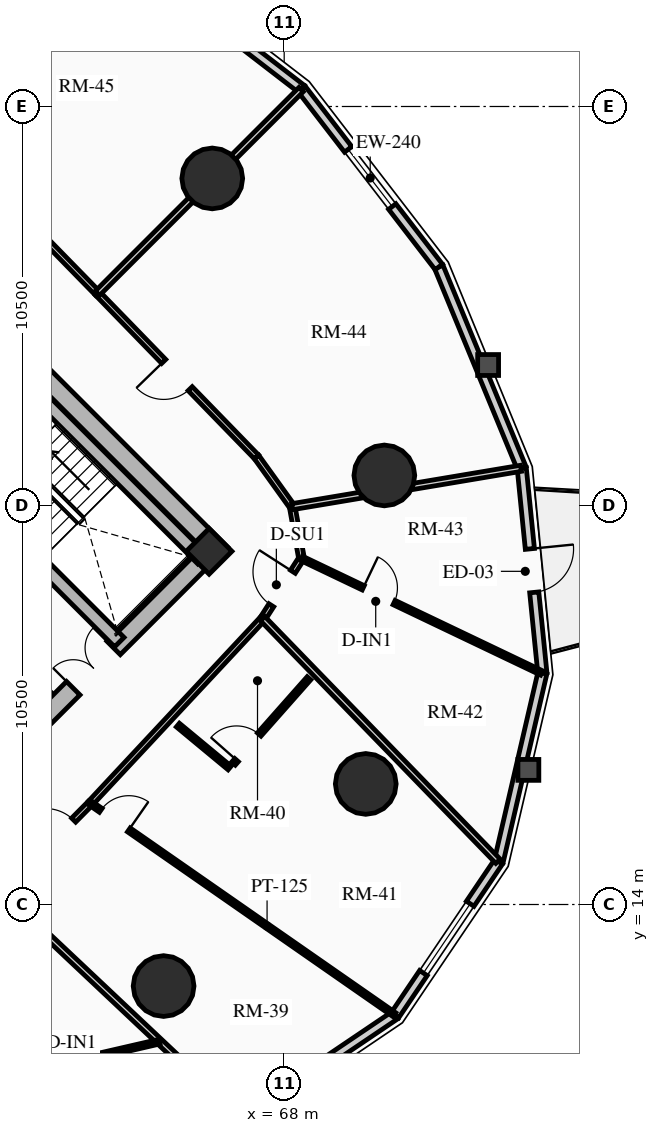
"""IFC4 building model, lengths in metres.
Left out: names, types, materials, properties, quantities, classifications, styles, units other than length and angle.
Written with IfcOpenShell. Run it as: python <this file> out.ifc"""

import sys

from ifc_helpers import new_model, si_unit, direction, frame, frame_2d, origin, origin_2d, place, context, subcontext, project, spatial, rectangle, circle, extrude, source, transform, mapped, element, fill, save


model = new_model("IFC4")
c1 = context("Model", 3, precision=1e-05, world=origin(), true_north=direction((0.0, 1.0)))
c2 = subcontext(c1, "Body", "Model", "MODEL_VIEW")
j1 = project(units=[si_unit("LENGTHUNIT", "METRE"), si_unit("PLANEANGLEUNIT", "RADIAN")], contexts=[c1])
p1 = place(None, origin())
s1 = spatial("IfcSite", under=j1, at=p1, CompositionType="ELEMENT")
p2 = place(p1, origin())
s2 = spatial("IfcBuilding", under=s1, at=p2, CompositionType="ELEMENT")
p3 = place(p2, frame((0.0, 0.0, 42.37)))
s3 = spatial("IfcBuildingStorey", under=s2, at=p3, CompositionType="ELEMENT", Elevation=42.37)
p4 = place(p3, frame((66.339, 23.227, 0.0), z_axis=(0.0, 0.0, 1.0), x_axis=(-0.707106781187, 0.707106781187, 0.0)))
e1 = element("IfcWall", 1, at=p4, inside=s3, PredefinedType="SHEAR", context=c2, shape_type="SweptSolid", body=[
    extrude(rectangle(XDim=14.3, YDim=0.5, at=frame_2d((7.15, 0.0))), origin(), (0.0, 0.0, 1.0), 2.91),
])
p5 = place(p3, frame((58.596, 15.838, 0.0), z_axis=(0.0, 0.0, 1.0), x_axis=(0.707106781187, 0.707106781187, 0.0)))
e2 = element("IfcWall", 2, at=p5, inside=s3, PredefinedType="SHEAR", context=c2, shape_type="SweptSolid", body=[
    extrude(rectangle(XDim=10.7, YDim=0.5, at=frame_2d((5.35, 0.0))), origin(), (0.0, 0.0, 1.0), 2.91),
])
m1 = source(origin(), c2, "Body", "SweptSolid", [
    extrude(rectangle(XDim=1.5, YDim=2.02, at=frame_2d((0.75, 1.01))), frame((0.0, 0.26, 0.0), z_axis=(0.0, -1.0, 0.0), x_axis=(1.0, 0.0, 0.0)), (0.0, 0.0, 1.0), 0.52),
])
p6 = place(p5, frame((5.45, 0.0, 0.0)))
e3 = element("IfcOpeningElement", 3, at=p6, cuts=e2, PredefinedType="OPENING", context=c2, shape_type="MappedRepresentation", body=[
    mapped(m1, transform((0.0, 0.0, 0.0), x_axis=(1.0, 0.0, 0.0), y_axis=(0.0, 1.0, 0.0), z_axis=(0.0, 0.0, 1.0), scale=1.0)),
])
p7 = place(p3, frame((63.662, 20.904, 0.0), z_axis=(0.0, 0.0, 1.0), x_axis=(-0.707106781187, 0.707106781187, 0.0)))
e4 = element("IfcWall", 4, at=p7, inside=s3, PredefinedType="SHEAR", context=c2, shape_type="SweptSolid", body=[
    extrude(rectangle(XDim=13.8, YDim=0.35, at=frame_2d((6.9, 0.0))), origin(), (0.0, 0.0, 1.0), 2.91),
])
m2 = source(origin(), c2, "Body", "SweptSolid", [
    extrude(rectangle(XDim=1.1, YDim=2.015, at=frame_2d((0.55, 1.007))), frame((0.0, 0.185, 0.0), z_axis=(0.0, -1.0, 0.0), x_axis=(1.0, 0.0, 0.0)), (0.0, 0.0, 1.0), 0.37),
])
p8 = place(p7, frame((10.025, 0.0, 0.0)))
e5 = element("IfcOpeningElement", 5, at=p8, cuts=e4, PredefinedType="OPENING", context=c2, shape_type="MappedRepresentation", body=[
    mapped(m2, transform((0.0, 0.0, 0.0), x_axis=(1.0, 0.0, 0.0), y_axis=(0.0, 1.0, 0.0), z_axis=(0.0, 0.0, 1.0), scale=1.0)),
])
p9 = place(p7, frame((12.025, 0.0, 0.0)))
e6 = element("IfcOpeningElement", 6, at=p9, cuts=e4, PredefinedType="OPENING", context=c2, shape_type="MappedRepresentation", body=[
    mapped(m2, transform((0.0, 0.0, 0.0), x_axis=(1.0, 0.0, 0.0), y_axis=(0.0, 1.0, 0.0), z_axis=(0.0, 0.0, 1.0), scale=1.0)),
])
m3 = source(origin(), c2, "Body", "SweptSolid", [
    extrude(rectangle(XDim=1.15, YDim=2.02, at=frame_2d((0.575, 1.01))), frame((0.0, 0.185, 0.0), z_axis=(0.0, -1.0, 0.0), x_axis=(1.0, 0.0, 0.0)), (0.0, 0.0, 1.0), 0.37),
])
p10 = place(p7, frame((5.33, 0.0, 0.0)))
e7 = element("IfcOpeningElement", 7, at=p10, cuts=e4, PredefinedType="OPENING", context=c2, shape_type="MappedRepresentation", body=[
    mapped(m3, transform((0.0, 0.0, 0.0), x_axis=(1.0, 0.0, 0.0), y_axis=(0.0, 1.0, 0.0), z_axis=(0.0, 0.0, 1.0), scale=1.0)),
])
p11 = place(p3, frame((65.847, 23.089, 0.0), z_axis=(0.0, 0.0, 1.0), x_axis=(-0.707106781187, 0.707106781187, 0.0)))
e8 = element("IfcWall", 8, at=p11, inside=s3, PredefinedType="SHEAR", context=c2, shape_type="SweptSolid", body=[
    extrude(rectangle(XDim=6.745, YDim=0.35, at=frame_2d((3.373, 0.0))), origin(), (0.0, 0.0, 1.0), 2.91),
])
p12 = place(p3, frame((66.024, 23.294, 0.0), z_axis=(0.0, 0.0, 1.0), x_axis=(0.707106781187, 0.707106781187, 0.0)))
e9 = element("IfcColumn", 9, at=p12, inside=s3, PredefinedType="COLUMN", context=c2, shape_type="SweptSolid", body=[
    extrude(rectangle(XDim=0.85, YDim=0.85, at=origin_2d()), origin(), (0.0, 0.0, 1.0), 2.91),
])
for number, where, z_axis, x_axis in (
    (10, (66.107, 33.107, 0.0), (0.0, 0.0, 1.0), (1.0, 0.0, 0.0)),
    (11, (64.827, 11.854, 0.0), (0.0, 0.0, 1.0), (1.0, 0.0, 0.0)),
    (12, (70.146, 17.173, 0.0), (0.0, 0.0, 1.0), (1.0, 0.0, 0.0)),
    (13, (70.635, 25.291, 0.0), (0.0, 0.0, 1.0), (1.0, 0.0, 0.0)),
):
    element("IfcColumn", number, at=place(p3, frame(where, z_axis=z_axis, x_axis=x_axis)), inside=s3, PredefinedType="USERDEFINED", context=c2, shape_type="SweptSolid", body=[
        extrude(circle(Radius=0.8, at=origin_2d()), origin(), (0.0, 0.0, 1.0), 2.91),
    ])
p13 = place(p3, frame((63.778, 39.068, 0.0), z_axis=(0.0, 0.0, 1.0), x_axis=(0.792020182601, -0.610494906082, 0.0)))
e14 = element("IfcWall", 14, at=p13, inside=s3, PredefinedType="SOLIDWALL", context=c2, shape_type="SweptSolid", body=[
    extrude(rectangle(XDim=5.911, YDim=0.24, at=frame_2d((2.956, 0.0))), origin(), (0.0, 0.0, 1.0), 2.073),
])
p14 = place(p3, frame((70.914, 11.086, 0.0), z_axis=(0.0, 0.0, 1.0), x_axis=(-0.828748297084, -0.559621532896, 0.0)))
e15 = element("IfcWall", 15, at=p14, inside=s3, PredefinedType="SOLIDWALL", context=c2, shape_type="SweptSolid", body=[
    extrude(rectangle(XDim=4.879, YDim=0.24, at=frame_2d((2.439, 0.0))), origin(), (0.0, 0.0, 1.0), 2.073),
])
p15 = place(p3, frame((73.644, 15.129, 0.0), z_axis=(0.0, 0.0, 1.0), x_axis=(-0.559621532896, -0.828748297084, 0.0)))
e16 = element("IfcWall", 16, at=p15, inside=s3, PredefinedType="SOLIDWALL", context=c2, shape_type="SweptSolid", body=[
    extrude(rectangle(XDim=4.879, YDim=0.24, at=frame_2d((2.439, 0.0))), origin(), (0.0, 0.0, 1.0), 2.073),
])
m4 = source(origin(), c2, "Body", "SweptSolid", [
    extrude(rectangle(XDim=2.2, YDim=1.35, at=frame_2d((1.1, 0.675))), frame((0.0, 0.13, 0.0), z_axis=(0.0, -1.0, 0.0), x_axis=(1.0, 0.0, 0.0)), (0.0, 0.0, 1.0), 0.26),
])
p16 = place(p15, frame((1.339, 0.0, 0.65)))
e17 = element("IfcOpeningElement", 17, at=p16, cuts=e16, PredefinedType="OPENING", context=c2, shape_type="MappedRepresentation", body=[
    mapped(m4, transform((0.0, 0.0, 0.0), x_axis=(1.0, 0.0, 0.0), y_axis=(0.0, 1.0, 0.0), z_axis=(0.0, 0.0, 1.0), scale=1.0)),
])
p17 = place(p3, frame((74.794, 20.09, 0.0), z_axis=(0.0, 0.0, 1.0), x_axis=(-0.22582585901, -0.974167686491, 0.0)))
e18 = element("IfcWall", 18, at=p17, inside=s3, PredefinedType="SOLIDWALL", context=c2, shape_type="SweptSolid", body=[
    extrude(rectangle(XDim=5.092, YDim=0.24, at=frame_2d((2.546, 0.0))), origin(), (0.0, 0.0, 1.0), 2.073),
])
p18 = place(p3, frame((74.251, 25.482, 0.0), z_axis=(0.0, 0.0, 1.0), x_axis=(0.100190592135, -0.994968263437, 0.0)))
e19 = element("IfcWall", 19, at=p18, inside=s3, PredefinedType="SOLIDWALL", context=c2, shape_type="SweptSolid", body=[
    extrude(rectangle(XDim=5.419, YDim=0.24, at=frame_2d((2.71, 0.0))), origin(), (0.0, 0.0, 1.0), 2.073),
])
m5 = source(origin(), c2, "Body", "SweptSolid", [
    extrude(rectangle(XDim=1.15, YDim=2.005, at=frame_2d((0.575, 1.002))), frame((0.0, 0.13, 0.0), z_axis=(0.0, -1.0, 0.0), x_axis=(1.0, 0.0, 0.0)), (0.0, 0.0, 1.0), 0.26),
])
p19 = place(p18, frame((2.135, 0.0, 0.0)))
e20 = element("IfcOpeningElement", 20, at=p19, cuts=e19, PredefinedType="OPENING", context=c2, shape_type="MappedRepresentation", body=[
    mapped(m5, transform((0.0, 0.0, 0.0), x_axis=(1.0, 0.0, 0.0), y_axis=(0.0, 1.0, 0.0), z_axis=(0.0, 0.0, 1.0), scale=1.0)),
])
p20 = place(p3, frame((72.068, 30.778, 0.0), z_axis=(0.0, 0.0, 1.0), x_axis=(0.381077764176, -0.924542988536, 0.0)))
e21 = element("IfcWall", 21, at=p20, inside=s3, PredefinedType="SOLIDWALL", context=c2, shape_type="SweptSolid", body=[
    extrude(rectangle(XDim=5.728, YDim=0.24, at=frame_2d((2.864, 0.0))), origin(), (0.0, 0.0, 1.0), 2.073),
])
p21 = place(p3, frame((68.459, 35.459, 0.0), z_axis=(0.0, 0.0, 1.0), x_axis=(0.610494906082, -0.792020182601, 0.0)))
e22 = element("IfcWall", 22, at=p21, inside=s3, PredefinedType="SOLIDWALL", context=c2, shape_type="SweptSolid", body=[
    extrude(rectangle(XDim=5.911, YDim=0.24, at=frame_2d((2.956, 0.0))), origin(), (0.0, 0.0, 1.0), 2.073),
])
m6 = source(origin(), c2, "Body", "SweptSolid", [
    extrude(rectangle(XDim=1.9, YDim=1.35, at=frame_2d((0.95, 0.675))), frame((0.0, 0.13, 0.0), z_axis=(0.0, -1.0, 0.0), x_axis=(1.0, 0.0, 0.0)), (0.0, 0.0, 1.0), 0.26),
])
p22 = place(p21, frame((2.005, 0.0, 0.65)))
e23 = element("IfcOpeningElement", 23, at=p22, cuts=e22, PredefinedType="OPENING", context=c2, shape_type="MappedRepresentation", body=[
    mapped(m6, transform((0.0, 0.0, 0.0), x_axis=(1.0, 0.0, 0.0), y_axis=(0.0, 1.0, 0.0), z_axis=(0.0, 0.0, 1.0), scale=1.0)),
])
p23 = place(p3, frame((63.086, 30.086, 0.0), z_axis=(0.0, 0.0, 1.0), x_axis=(-0.699075897379, 0.715047473741, 0.0)))
e24 = element("IfcWall", 24, at=p23, inside=s3, PredefinedType="PARTITIONING", context=c2, shape_type="SweptSolid", body=[
    extrude(rectangle(XDim=6.114, YDim=0.15, at=frame_2d((3.057, 0.0))), origin(), (0.0, 0.0, 1.0), 2.159),
])
p24 = place(p3, frame((60.562, 14.31, 0.0), z_axis=(0.0, 0.0, 1.0), x_axis=(0.704566236161, 0.709638230975, 0.0)))
e25 = element("IfcWall", 25, at=p24, inside=s3, PredefinedType="PARTITIONING", context=c2, shape_type="SweptSolid", body=[
    extrude(rectangle(XDim=3.321, YDim=0.15, at=frame_2d((1.661, 0.0))), origin(), (0.0, 0.0, 1.0), 2.159),
])
m7 = source(origin(), c2, "Body", "SweptSolid", [
    extrude(rectangle(XDim=1.05, YDim=2.015, at=frame_2d((0.525, 1.007))), frame((0.0, 0.085, 0.0), z_axis=(0.0, -1.0, 0.0), x_axis=(1.0, 0.0, 0.0)), (0.0, 0.0, 1.0), 0.17),
])
p25 = place(p24, frame((1.643, 0.0, 0.0)))
e26 = element("IfcOpeningElement", 26, at=p25, cuts=e25, PredefinedType="OPENING", context=c2, shape_type="MappedRepresentation", body=[
    mapped(m7, transform((0.0, 0.0, 0.0), x_axis=(1.0, 0.0, 0.0), y_axis=(0.0, 1.0, 0.0), z_axis=(0.0, 0.0, 1.0), scale=1.0)),
])
p26 = place(p3, frame((62.903, 16.667, 0.0), z_axis=(0.0, 0.0, 1.0), x_axis=(0.682371947497, 0.731005147225, 0.0)))
e27 = element("IfcWall", 27, at=p26, inside=s3, PredefinedType="PARTITIONING", context=c2, shape_type="SweptSolid", body=[
    extrude(rectangle(XDim=6.642, YDim=0.15, at=frame_2d((3.321, 0.0))), origin(), (0.0, 0.0, 1.0), 2.159),
])
p27 = place(p3, frame((67.435, 21.521, 0.0), z_axis=(0.0, 0.0, 1.0), x_axis=(0.540777197838, 0.841165870859, 0.0)))
e28 = element("IfcWall", 28, at=p27, inside=s3, PredefinedType="PARTITIONING", context=c2, shape_type="SweptSolid", body=[
    extrude(rectangle(XDim=1.888, YDim=0.15, at=frame_2d((0.944, 0.0))), origin(), (0.0, 0.0, 1.0), 2.205),
])
p28 = place(p27, frame((0.419, 0.0, 0.0)))
e29 = element("IfcOpeningElement", 29, at=p28, cuts=e28, PredefinedType="OPENING", context=c2, shape_type="MappedRepresentation", body=[
    mapped(m7, transform((0.0, 0.0, 0.0), x_axis=(1.0, 0.0, 0.0), y_axis=(0.0, 1.0, 0.0), z_axis=(0.0, 0.0, 1.0), scale=1.0)),
])
p29 = place(p3, frame((68.456, 23.11, 0.0), z_axis=(0.0, 0.0, 1.0), x_axis=(-0.1772522795, 0.984165448191, 0.0)))
e30 = element("IfcWall", 30, at=p29, inside=s3, PredefinedType="PARTITIONING", context=c2, shape_type="SweptSolid", body=[
    extrude(rectangle(XDim=1.382, YDim=0.15, at=frame_2d((0.691, 0.0))), origin(), (0.0, 0.0, 1.0), 2.159),
])
p30 = place(p3, frame((68.211, 24.469, 0.0), z_axis=(0.0, 0.0, 1.0), x_axis=(-0.583012141368, 0.812463441034, 0.0)))
e31 = element("IfcWall", 31, at=p30, inside=s3, PredefinedType="PARTITIONING", context=c2, shape_type="SweptSolid", body=[
    extrude(rectangle(XDim=1.613, YDim=0.15, at=frame_2d((0.807, 0.0))), origin(), (0.0, 0.0, 1.0), 2.205),
])
p31 = place(p3, frame((67.27, 25.78, 0.0), z_axis=(0.0, 0.0, 1.0), x_axis=(-0.696847842907, 0.717218992942, 0.0)))
e32 = element("IfcWall", 32, at=p31, inside=s3, PredefinedType="PARTITIONING", context=c2, shape_type="SweptSolid", body=[
    extrude(rectangle(XDim=6.004, YDim=0.15, at=frame_2d((3.002, 0.0))), origin(), (0.0, 0.0, 1.0), 2.635),
])
m8 = source(origin(), c2, "Body", "SweptSolid", [
    extrude(rectangle(XDim=1.0, YDim=2.015, at=frame_2d((0.5, 1.007))), frame((0.0, 0.085, 0.0), z_axis=(0.0, -1.0, 0.0), x_axis=(1.0, 0.0, 0.0)), (0.0, 0.0, 1.0), 0.17),
])
p32 = place(p31, frame((2.502, 0.0, 0.0)))
e33 = element("IfcOpeningElement", 33, at=p32, cuts=e32, PredefinedType="OPENING", context=c2, shape_type="MappedRepresentation", body=[
    mapped(m8, transform((0.0, 0.0, 0.0), x_axis=(1.0, 0.0, 0.0), y_axis=(0.0, 1.0, 0.0), z_axis=(0.0, 0.0, 1.0), scale=1.0)),
])
p33 = place(p3, frame((63.086, 30.086, 0.0), z_axis=(0.0, 0.0, 1.0), x_axis=(0.707106781187, 0.707106781187, 0.0)))
e34 = element("IfcWall", 34, at=p33, inside=s3, PredefinedType="PARTITIONING", context=c2, shape_type="SweptSolid", body=[
    extrude(rectangle(XDim=7.579, YDim=0.16, at=frame_2d((3.79, 0.0))), origin(), (0.0, 0.0, 1.0), 2.073),
])
p34 = place(p3, frame((60.562, 14.31, 0.0), z_axis=(0.0, 0.0, 1.0), x_axis=(0.727781661561, -0.685808904211, 0.0)))
e35 = element("IfcWall", 35, at=p34, inside=s3, PredefinedType="PARTITIONING", context=c2, shape_type="SweptSolid", body=[
    extrude(rectangle(XDim=8.655, YDim=0.16, at=frame_2d((4.328, 0.0))), origin(), (0.0, 0.0, 1.0), 2.073),
])
p35 = place(p3, frame((67.435, 21.521, 0.0), z_axis=(0.0, 0.0, 1.0), x_axis=(0.6962628802, -0.717786877601, 0.0)))
e36 = element("IfcWall", 36, at=p35, inside=s3, PredefinedType="PARTITIONING", context=c2, shape_type="SweptSolid", body=[
    extrude(rectangle(XDim=8.893, YDim=0.16, at=frame_2d((4.446, 0.0))), origin(), (0.0, 0.0, 1.0), 2.073),
])
p36 = place(p3, frame((68.211, 24.469, 0.0), z_axis=(0.0, 0.0, 1.0), x_axis=(0.986231309699, 0.165371713934, 0.0)))
e37 = element("IfcWall", 37, at=p36, inside=s3, PredefinedType="PARTITIONING", context=c2, shape_type="SweptSolid", body=[
    extrude(rectangle(XDim=6.104, YDim=0.16, at=frame_2d((3.052, 0.0))), origin(), (0.0, 0.0, 1.0), 2.073),
])
p37 = place(p3, frame((60.921, 9.517, 0.0), z_axis=(0.0, 0.0, 1.0), x_axis=(0.974453436038, 0.224589627973, 0.0)))
e38 = element("IfcWall", 38, at=p37, inside=s3, PredefinedType="PARTITIONING", context=c2, shape_type="SweptSolid", body=[
    extrude(rectangle(XDim=3.898, YDim=0.125, at=frame_2d((1.949, 0.0))), origin(), (0.0, 0.0, 1.0), 2.205),
])
p38 = place(p3, frame((62.903, 16.667, 0.0), z_axis=(0.0, 0.0, 1.0), x_axis=(0.820761665638, -0.571270766116, 0.0)))
e39 = element("IfcWall", 39, at=p38, inside=s3, PredefinedType="PARTITIONING", context=c2, shape_type="SweptSolid", body=[
    extrude(rectangle(XDim=9.743, YDim=0.125, at=frame_2d((4.872, 0.0))), origin(), (0.0, 0.0, 1.0), 2.073),
])
m9 = source(origin(), c2, "Body", "SweptSolid", [
    extrude(rectangle(XDim=0.9, YDim=2.005, at=frame_2d((0.45, 1.002))), frame((0.0, 0.073, 0.0), z_axis=(0.0, -1.0, 0.0), x_axis=(1.0, 0.0, 0.0)), (0.0, 0.0, 1.0), 0.145),
])
p39 = place(p38, frame((0.33, 0.0, 0.0)))
e40 = element("IfcOpeningElement", 40, at=p39, cuts=e39, PredefinedType="OPENING", context=c2, shape_type="MappedRepresentation", body=[
    mapped(m9, transform((0.0, 0.0, 0.0), x_axis=(1.0, 0.0, 0.0), y_axis=(0.0, 1.0, 0.0), z_axis=(0.0, 0.0, 1.0), scale=1.0)),
])
p40 = place(p3, frame((65.202, 18.721, 0.0), z_axis=(0.0, 0.0, 1.0), x_axis=(0.769814202386, -0.638268042287, 0.0)))
e41 = element("IfcWall", 41, at=p40, inside=s3, PredefinedType="PARTITIONING", context=c2, shape_type="SweptSolid", body=[
    extrude(rectangle(XDim=1.769, YDim=0.125, at=frame_2d((0.884, 0.0))), origin(), (0.0, 0.0, 1.0), 2.635),
])
p41 = place(p3, frame((66.667, 17.709, 0.0), z_axis=(0.0, 0.0, 1.0), x_axis=(0.662510581678, 0.749052554341, 0.0)))
e42 = element("IfcWall", 42, at=p41, inside=s3, PredefinedType="PARTITIONING", context=c2, shape_type="SweptSolid", body=[
    extrude(rectangle(XDim=2.996, YDim=0.125, at=frame_2d((1.498, 0.0))), origin(), (0.0, 0.0, 1.0), 2.159),
])
p42 = place(p41, frame((0.12, 0.0, 0.0)))
e43 = element("IfcOpeningElement", 43, at=p42, cuts=e42, PredefinedType="OPENING", context=c2, shape_type="MappedRepresentation", body=[
    mapped(m9, transform((0.0, 0.0, 0.0), x_axis=(1.0, 0.0, 0.0), y_axis=(0.0, 1.0, 0.0), z_axis=(0.0, 0.0, 1.0), scale=1.0)),
])
p43 = place(p3, frame((68.456, 23.11, 0.0), z_axis=(0.0, 0.0, 1.0), x_axis=(0.902430819297, -0.430834790125, 0.0)))
e44 = element("IfcWall", 44, at=p43, inside=s3, PredefinedType="PARTITIONING", context=c2, shape_type="SweptSolid", body=[
    extrude(rectangle(XDim=7.002, YDim=0.125, at=frame_2d((3.501, 0.0))), origin(), (0.0, 0.0, 1.0), 2.073),
])
p44 = place(p43, frame((1.8, 0.0, 0.0)))
e45 = element("IfcOpeningElement", 45, at=p44, cuts=e44, PredefinedType="OPENING", context=c2, shape_type="MappedRepresentation", body=[
    mapped(m9, transform((0.0, 0.0, 0.0), x_axis=(1.0, 0.0, 0.0), y_axis=(0.0, 1.0, 0.0), z_axis=(0.0, 0.0, 1.0), scale=1.0)),
])
m10 = source(origin(), c2, "Body", "SweptSolid", [
    extrude(rectangle(XDim=2.2, YDim=1.35, at=frame_2d((1.1, 0.675))), frame((0.0, 0.03, 0.0), z_axis=(0.0, -1.0, 0.0), x_axis=(1.0, 0.0, 0.0)), (0.0, 0.0, 1.0), 0.06),
])
p45 = place(p16, origin())
e46 = element("IfcWindow", 46, at=p45, inside=s3, PartitioningType="DOUBLE_PANEL_VERTICAL", PredefinedType="WINDOW", context=c2, shape_type="MappedRepresentation", body=[
    mapped(m10, transform((0.0, 0.0, 0.0), x_axis=(1.0, 0.0, 0.0), y_axis=(0.0, 1.0, 0.0), z_axis=(0.0, 0.0, 1.0), scale=1.0)),
])
fill(e17, e46)
m11 = source(origin(), c2, "Body", "SweptSolid", [
    extrude(rectangle(XDim=1.15, YDim=2.005, at=frame_2d((0.575, 1.002))), frame((0.0, 0.025, 0.0), z_axis=(0.0, -1.0, 0.0), x_axis=(1.0, 0.0, 0.0)), (0.0, 0.0, 1.0), 0.05),
])
p46 = place(p19, origin())
e47 = element("IfcDoor", 47, at=p46, inside=s3, OperationType="SINGLE_SWING_LEFT", PredefinedType="DOOR", context=c2, shape_type="MappedRepresentation", body=[
    mapped(m11, transform((0.0, 0.0, 0.0), x_axis=(1.0, 0.0, 0.0), y_axis=(0.0, 1.0, 0.0), z_axis=(0.0, 0.0, 1.0), scale=1.0)),
])
fill(e20, e47)
m12 = source(origin(), c2, "Body", "SweptSolid", [
    extrude(rectangle(XDim=1.9, YDim=1.35, at=frame_2d((0.95, 0.675))), frame((0.0, 0.03, 0.0), z_axis=(0.0, -1.0, 0.0), x_axis=(1.0, 0.0, 0.0)), (0.0, 0.0, 1.0), 0.06),
])
p47 = place(p22, origin())
e48 = element("IfcWindow", 48, at=p47, inside=s3, PartitioningType="DOUBLE_PANEL_VERTICAL", PredefinedType="WINDOW", context=c2, shape_type="MappedRepresentation", body=[
    mapped(m12, transform((0.0, 0.0, 0.0), x_axis=(1.0, 0.0, 0.0), y_axis=(0.0, 1.0, 0.0), z_axis=(0.0, 0.0, 1.0), scale=1.0)),
])
fill(e23, e48)
m13 = source(origin(), c2, "Body", "SweptSolid", [
    extrude(rectangle(XDim=1.5, YDim=2.02, at=frame_2d((0.75, 1.01))), frame((0.0, 0.025, 0.0), z_axis=(0.0, -1.0, 0.0), x_axis=(1.0, 0.0, 0.0)), (0.0, 0.0, 1.0), 0.05),
])
p48 = place(p6, origin())
e49 = element("IfcDoor", 49, at=p48, inside=s3, OperationType="DOUBLE_DOOR_SINGLE_SWING", PredefinedType="DOOR", context=c2, shape_type="MappedRepresentation", body=[
    mapped(m13, transform((0.0, 0.0, 0.0), x_axis=(1.0, 0.0, 0.0), y_axis=(0.0, 1.0, 0.0), z_axis=(0.0, 0.0, 1.0), scale=1.0)),
])
fill(e3, e49)
m14 = source(origin(), c2, "Body", "SweptSolid", [
    extrude(rectangle(XDim=1.05, YDim=2.015, at=frame_2d((0.525, 1.007))), frame((0.0, 0.025, 0.0), z_axis=(0.0, -1.0, 0.0), x_axis=(1.0, 0.0, 0.0)), (0.0, 0.0, 1.0), 0.05),
])
p49 = place(p25, origin())
e50 = element("IfcDoor", 50, at=p49, inside=s3, OperationType="SINGLE_SWING_LEFT", PredefinedType="DOOR", context=c2, shape_type="MappedRepresentation", body=[
    mapped(m14, transform((0.0, 0.0, 0.0), x_axis=(1.0, 0.0, 0.0), y_axis=(0.0, 1.0, 0.0), z_axis=(0.0, 0.0, 1.0), scale=1.0)),
])
fill(e26, e50)
m15 = source(origin(), c2, "Body", "SweptSolid", [
    extrude(rectangle(XDim=0.9, YDim=2.005, at=frame_2d((0.45, 1.002))), frame((0.0, 0.025, 0.0), z_axis=(0.0, -1.0, 0.0), x_axis=(1.0, 0.0, 0.0)), (0.0, 0.0, 1.0), 0.05),
])
p50 = place(p39, origin())
e51 = element("IfcDoor", 51, at=p50, inside=s3, OperationType="SINGLE_SWING_RIGHT", PredefinedType="DOOR", context=c2, shape_type="MappedRepresentation", body=[
    mapped(m15, transform((0.0, 0.0, 0.0), x_axis=(1.0, 0.0, 0.0), y_axis=(0.0, 1.0, 0.0), z_axis=(0.0, 0.0, 1.0), scale=1.0)),
])
fill(e40, e51)
p51 = place(p42, origin())
e52 = element("IfcDoor", 52, at=p51, inside=s3, OperationType="SINGLE_SWING_LEFT", PredefinedType="DOOR", context=c2, shape_type="MappedRepresentation", body=[
    mapped(m15, transform((0.0, 0.0, 0.0), x_axis=(1.0, 0.0, 0.0), y_axis=(0.0, 1.0, 0.0), z_axis=(0.0, 0.0, 1.0), scale=1.0)),
])
fill(e43, e52)
p52 = place(p28, origin())
e53 = element("IfcDoor", 53, at=p52, inside=s3, OperationType="SINGLE_SWING_RIGHT", PredefinedType="DOOR", context=c2, shape_type="MappedRepresentation", body=[
    mapped(m14, transform((0.0, 0.0, 0.0), x_axis=(1.0, 0.0, 0.0), y_axis=(0.0, 1.0, 0.0), z_axis=(0.0, 0.0, 1.0), scale=1.0)),
])
fill(e29, e53)
p53 = place(p44, origin())
e54 = element("IfcDoor", 54, at=p53, inside=s3, OperationType="SINGLE_SWING_LEFT", PredefinedType="DOOR", context=c2, shape_type="MappedRepresentation", body=[
    mapped(m15, transform((0.0, 0.0, 0.0), x_axis=(1.0, 0.0, 0.0), y_axis=(0.0, 1.0, 0.0), z_axis=(0.0, 0.0, 1.0), scale=1.0)),
])
fill(e45, e54)
m16 = source(origin(), c2, "Body", "SweptSolid", [
    extrude(rectangle(XDim=1.0, YDim=2.015, at=frame_2d((0.5, 1.007))), frame((0.0, 0.025, 0.0), z_axis=(0.0, -1.0, 0.0), x_axis=(1.0, 0.0, 0.0)), (0.0, 0.0, 1.0), 0.05),
])
p54 = place(p32, origin())
e55 = element("IfcDoor", 55, at=p54, inside=s3, OperationType="SINGLE_SWING_RIGHT", PredefinedType="DOOR", context=c2, shape_type="MappedRepresentation", body=[
    mapped(m16, transform((0.0, 0.0, 0.0), x_axis=(1.0, 0.0, 0.0), y_axis=(0.0, 1.0, 0.0), z_axis=(0.0, 0.0, 1.0), scale=1.0)),
])
fill(e33, e55)
save(model, sys.argv[1])
